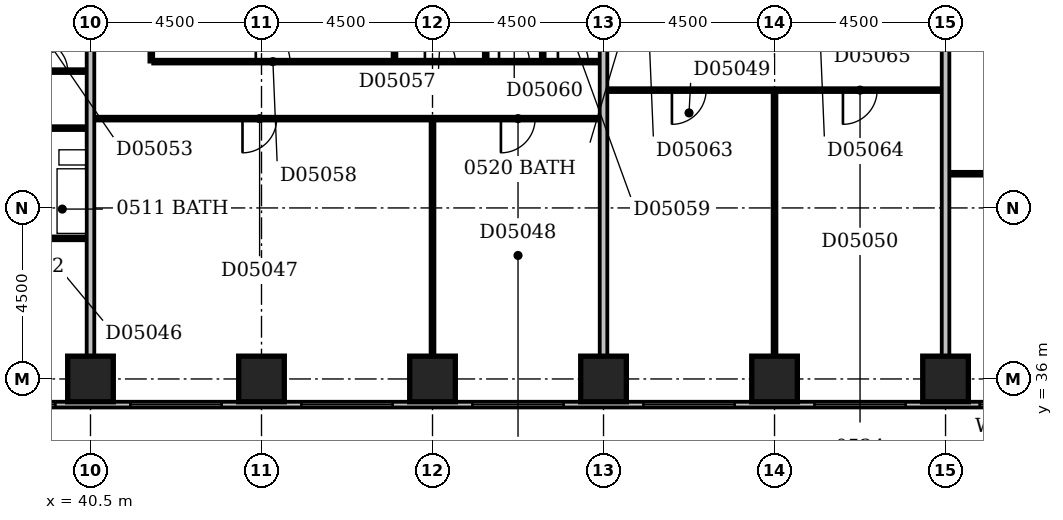
"""IFC4 building model, lengths in metres.
Left out: names, types, materials, properties, quantities, classifications, styles, units other than length and angle.
Written with IfcOpenShell. Run it as: python <this file> out.ifc"""

import sys

from ifc_helpers import new_model, si_unit, direction, frame, frame_2d, origin, origin_2d, place, context, subcontext, project, spatial, rectangle, extrude, element, fill, save


model = new_model("IFC4")
c1 = context("Model", 3, precision=1e-05, world=origin(), true_north=direction((0.0, 1.0)))
c2 = subcontext(c1, "Body", "Model", "MODEL_VIEW")
j1 = project(units=[si_unit("LENGTHUNIT", "METRE"), si_unit("PLANEANGLEUNIT", "RADIAN")], contexts=[c1])
p1 = place(None, origin())
s1 = spatial("IfcSite", under=j1, at=p1, CompositionType="ELEMENT")
p2 = place(p1, origin())
s2 = spatial("IfcBuilding", under=s1, at=p2, CompositionType="ELEMENT")
p3 = place(p2, frame((0.0, 0.0, 29.0)))
s3 = spatial("IfcBuildingStorey", under=s2, at=p3, CompositionType="ELEMENT", Elevation=29.0)
for number, where, z_axis, x_axis in (
    (1, (40.5, 36.0, -0.3), (0.0, 0.0, 1.0), (1.0, 0.0, 0.0)),
    (2, (45.0, 36.0, -0.3), (0.0, 0.0, 1.0), (1.0, 0.0, 0.0)),
    (3, (49.5, 36.0, -0.3), (0.0, 0.0, 1.0), (1.0, 0.0, 0.0)),
    (4, (54.0, 36.0, -0.3), (0.0, 0.0, 1.0), (1.0, 0.0, 0.0)),
    (5, (58.5, 36.0, -0.3), (0.0, 0.0, 1.0), (1.0, 0.0, 0.0)),
    (6, (63.0, 36.0, -0.3), (0.0, 0.0, 1.0), (1.0, 0.0, 0.0)),
):
    element("IfcColumn", number, at=place(p3, frame(where, z_axis=z_axis, x_axis=x_axis)), inside=s3, PredefinedType="COLUMN", context=c2, shape_type="SweptSolid", body=[
        extrude(rectangle(XDim=1.2, YDim=1.2, at=origin_2d()), origin(), (0.0, 0.0, 1.0), 3.6),
    ])
p4 = place(p3, frame((23.1, 35.325, 0.0), z_axis=(0.0, 0.0, 1.0), x_axis=(1.0, 0.0, 0.0)))
e7 = element("IfcWall", 7, at=p4, inside=s3, PredefinedType="STANDARD", context=c2, shape_type="SweptSolid", body=[
    extrude(rectangle(XDim=45.15, YDim=0.15, at=frame_2d((22.575, 0.0))), origin(), (0.0, 0.0, 1.0), 2.7),
])
p5 = place(p4, frame((0.45, 0.0, 0.6)))
e8 = element("IfcOpeningElement", 8, at=p5, cuts=e7, PredefinedType="OPENING", context=c2, shape_type="SweptSolid", body=[
    extrude(rectangle(XDim=2.4, YDim=1.8, at=frame_2d((1.2, 0.9))), frame((0.0, 0.087, 0.0), z_axis=(0.0, -1.0, 0.0), x_axis=(1.0, 0.0, 0.0)), (0.0, 0.0, 1.0), 0.174),
])
p6 = place(p4, frame((4.95, 0.0, 0.6)))
e9 = element("IfcOpeningElement", 9, at=p6, cuts=e7, PredefinedType="OPENING", context=c2, shape_type="SweptSolid", body=[
    extrude(rectangle(XDim=2.4, YDim=1.8, at=frame_2d((1.2, 0.9))), frame((0.0, 0.087, 0.0), z_axis=(0.0, -1.0, 0.0), x_axis=(1.0, 0.0, 0.0)), (0.0, 0.0, 1.0), 0.174),
])
p7 = place(p4, frame((9.25, 0.0, 0.6)))
e10 = element("IfcOpeningElement", 10, at=p7, cuts=e7, PredefinedType="OPENING", context=c2, shape_type="SweptSolid", body=[
    extrude(rectangle(XDim=1.5, YDim=1.8, at=frame_2d((0.75, 0.9))), frame((0.0, 0.087, 0.0), z_axis=(0.0, -1.0, 0.0), x_axis=(1.0, 0.0, 0.0)), (0.0, 0.0, 1.0), 0.174),
])
p8 = place(p4, frame((15.277, 0.0, 0.6)))
e11 = element("IfcOpeningElement", 11, at=p8, cuts=e7, PredefinedType="OPENING", context=c2, shape_type="SweptSolid", body=[
    extrude(rectangle(XDim=1.2, YDim=1.8, at=frame_2d((0.6, 0.9))), frame((0.0, 0.087, 0.0), z_axis=(0.0, -1.0, 0.0), x_axis=(1.0, 0.0, 0.0)), (0.0, 0.0, 1.0), 0.174),
])
p9 = place(p4, frame((18.45, 0.0, 0.6)))
e12 = element("IfcOpeningElement", 12, at=p9, cuts=e7, PredefinedType="OPENING", context=c2, shape_type="SweptSolid", body=[
    extrude(rectangle(XDim=2.4, YDim=1.8, at=frame_2d((1.2, 0.9))), frame((0.0, 0.087, 0.0), z_axis=(0.0, -1.0, 0.0), x_axis=(1.0, 0.0, 0.0)), (0.0, 0.0, 1.0), 0.174),
])
p10 = place(p4, frame((22.95, 0.0, 0.6)))
e13 = element("IfcOpeningElement", 13, at=p10, cuts=e7, PredefinedType="OPENING", context=c2, shape_type="SweptSolid", body=[
    extrude(rectangle(XDim=2.4, YDim=1.8, at=frame_2d((1.2, 0.9))), frame((0.0, 0.087, 0.0), z_axis=(0.0, -1.0, 0.0), x_axis=(1.0, 0.0, 0.0)), (0.0, 0.0, 1.0), 0.174),
])
p11 = place(p4, frame((27.45, 0.0, 0.6)))
e14 = element("IfcOpeningElement", 14, at=p11, cuts=e7, PredefinedType="OPENING", context=c2, shape_type="SweptSolid", body=[
    extrude(rectangle(XDim=2.4, YDim=1.8, at=frame_2d((1.2, 0.9))), frame((0.0, 0.087, 0.0), z_axis=(0.0, -1.0, 0.0), x_axis=(1.0, 0.0, 0.0)), (0.0, 0.0, 1.0), 0.174),
])
p12 = place(p4, frame((31.95, 0.0, 0.6)))
e15 = element("IfcOpeningElement", 15, at=p12, cuts=e7, PredefinedType="OPENING", context=c2, shape_type="SweptSolid", body=[
    extrude(rectangle(XDim=2.4, YDim=1.8, at=frame_2d((1.2, 0.9))), frame((0.0, 0.087, 0.0), z_axis=(0.0, -1.0, 0.0), x_axis=(1.0, 0.0, 0.0)), (0.0, 0.0, 1.0), 0.174),
])
p13 = place(p4, frame((36.45, 0.0, 0.6)))
e16 = element("IfcOpeningElement", 16, at=p13, cuts=e7, PredefinedType="OPENING", context=c2, shape_type="SweptSolid", body=[
    extrude(rectangle(XDim=2.4, YDim=1.8, at=frame_2d((1.2, 0.9))), frame((0.0, 0.087, 0.0), z_axis=(0.0, -1.0, 0.0), x_axis=(1.0, 0.0, 0.0)), (0.0, 0.0, 1.0), 0.174),
])
p14 = place(p4, frame((40.797, 0.0, 0.6)))
e17 = element("IfcOpeningElement", 17, at=p14, cuts=e7, PredefinedType="OPENING", context=c2, shape_type="SweptSolid", body=[
    extrude(rectangle(XDim=0.6, YDim=1.8, at=frame_2d((0.3, 0.9))), frame((0.0, 0.087, 0.0), z_axis=(0.0, -1.0, 0.0), x_axis=(1.0, 0.0, 0.0)), (0.0, 0.0, 1.0), 0.174),
])
p15 = place(p3, frame((40.5, 36.6, 0.0), z_axis=(0.0, 0.0, 1.0), x_axis=(0.0, 1.0, 0.0)))
e18 = element("IfcWall", 18, at=p15, inside=s3, PredefinedType="PARTITIONING", context=c2, shape_type="SweptSolid", body=[
    extrude(rectangle(XDim=12.8, YDim=0.2, at=frame_2d((6.4, 0.0))), origin(), (0.0, 0.0, 1.0), 3.3),
])
p16 = place(p3, frame((49.5, 36.6, 0.0), z_axis=(0.0, 0.0, 1.0), x_axis=(0.0, 1.0, 0.0)))
e19 = element("IfcWall", 19, at=p16, inside=s3, PredefinedType="PARTITIONING", context=c2, shape_type="SweptSolid", body=[
    extrude(rectangle(XDim=6.2, YDim=0.1, at=frame_2d((3.1, 0.0))), origin(), (0.0, 0.0, 1.0), 3.3),
])
p17 = place(p3, frame((54.0, 36.6, 0.0), z_axis=(0.0, 0.0, 1.0), x_axis=(0.0, 1.0, 0.0)))
e20 = element("IfcWall", 20, at=p17, inside=s3, PredefinedType="PARTITIONING", context=c2, shape_type="SweptSolid", body=[
    extrude(rectangle(XDim=12.8, YDim=0.2, at=frame_2d((6.4, 0.0))), origin(), (0.0, 0.0, 1.0), 2.6),
])
p18 = place(p3, frame((58.5, 36.6, 0.0), z_axis=(0.0, 0.0, 1.0), x_axis=(0.0, 1.0, 0.0)))
e21 = element("IfcWall", 21, at=p18, inside=s3, PredefinedType="PARTITIONING", context=c2, shape_type="SweptSolid", body=[
    extrude(rectangle(XDim=6.95, YDim=0.1, at=frame_2d((3.475, 0.0))), origin(), (0.0, 0.0, 1.0), 3.3),
])
p19 = place(p3, frame((63.0, 36.6, 0.0), z_axis=(0.0, 0.0, 1.0), x_axis=(0.0, 1.0, 0.0)))
e22 = element("IfcWall", 22, at=p19, inside=s3, PredefinedType="PARTITIONING", context=c2, shape_type="SweptSolid", body=[
    extrude(rectangle(XDim=12.8, YDim=0.2, at=frame_2d((6.4, 0.0))), origin(), (0.0, 0.0, 1.0), 2.4),
])
p20 = place(p3, frame((38.25, 39.7, 0.0), z_axis=(0.0, 0.0, 1.0), x_axis=(1.0, 0.0, 0.0)))
e23 = element("IfcWall", 23, at=p20, inside=s3, PredefinedType="PLUMBINGWALL", context=c2, shape_type="SweptSolid", body=[
    extrude(rectangle(XDim=2.15, YDim=0.1, at=frame_2d((1.075, 0.0))), origin(), (0.0, 0.0, 1.0), 3.3),
])
p21 = place(p3, frame((63.1, 41.4, 0.0), z_axis=(0.0, 0.0, 1.0), x_axis=(1.0, 0.0, 0.0)))
e24 = element("IfcWall", 24, at=p21, inside=s3, PredefinedType="PARTITIONING", context=c2, shape_type="SweptSolid", body=[
    extrude(rectangle(XDim=5.0, YDim=0.1, at=frame_2d((2.5, 0.0))), origin(), (0.0, 0.0, 1.0), 3.3),
])
p22 = place(p21, frame((1.7, 0.0, 0.0)))
e25 = element("IfcOpeningElement", 25, at=p22, cuts=e24, PredefinedType="OPENING", context=c2, shape_type="SweptSolid", body=[
    extrude(rectangle(XDim=0.9, YDim=2.1, at=frame_2d((0.45, 1.05))), frame((0.0, 0.062, 0.0), z_axis=(0.0, -1.0, 0.0), x_axis=(1.0, 0.0, 0.0)), (0.0, 0.0, 1.0), 0.124),
])
p23 = place(p3, frame((22.6, 42.6, 0.0), z_axis=(0.0, 0.0, 1.0), x_axis=(1.0, 0.0, 0.0)))
e26 = element("IfcWall", 26, at=p23, inside=s3, PredefinedType="PARTITIONING", context=c2, shape_type="SweptSolid", body=[
    extrude(rectangle(XDim=17.8, YDim=0.1, at=frame_2d((8.9, 0.0))), origin(), (0.0, 0.0, 1.0), 3.3),
])
p24 = place(p23, frame((3.9, 0.0, 0.0)))
e27 = element("IfcOpeningElement", 27, at=p24, cuts=e26, PredefinedType="OPENING", context=c2, shape_type="SweptSolid", body=[
    extrude(rectangle(XDim=0.9, YDim=2.1, at=frame_2d((0.45, 1.05))), frame((0.0, 0.062, 0.0), z_axis=(0.0, -1.0, 0.0), x_axis=(1.0, 0.0, 0.0)), (0.0, 0.0, 1.0), 0.124),
])
p25 = place(p23, frame((10.7, 0.0, 0.0)))
e28 = element("IfcOpeningElement", 28, at=p25, cuts=e26, PredefinedType="OPENING", context=c2, shape_type="SweptSolid", body=[
    extrude(rectangle(XDim=0.9, YDim=2.1, at=frame_2d((0.45, 1.05))), frame((0.0, 0.062, 0.0), z_axis=(0.0, -1.0, 0.0), x_axis=(1.0, 0.0, 0.0)), (0.0, 0.0, 1.0), 0.124),
])
p26 = place(p23, frame((14.05, 0.0, 0.0)))
e29 = element("IfcOpeningElement", 29, at=p26, cuts=e26, PredefinedType="OPENING", context=c2, shape_type="SweptSolid", body=[
    extrude(rectangle(XDim=0.9, YDim=2.1, at=frame_2d((0.45, 1.05))), frame((0.0, 0.062, 0.0), z_axis=(0.0, -1.0, 0.0), x_axis=(1.0, 0.0, 0.0)), (0.0, 0.0, 1.0), 0.124),
])
p27 = place(p3, frame((40.6, 42.85, 0.0), z_axis=(0.0, 0.0, 1.0), x_axis=(1.0, 0.0, 0.0)))
e30 = element("IfcWall", 30, at=p27, inside=s3, PredefinedType="PARTITIONING", context=c2, shape_type="SweptSolid", body=[
    extrude(rectangle(XDim=13.3, YDim=0.1, at=frame_2d((6.65, 0.0))), origin(), (0.0, 0.0, 1.0), 3.3),
])
p28 = place(p27, frame((3.9, 0.0, 0.0)))
e31 = element("IfcOpeningElement", 31, at=p28, cuts=e30, PredefinedType="OPENING", context=c2, shape_type="SweptSolid", body=[
    extrude(rectangle(XDim=0.9, YDim=2.1, at=frame_2d((0.45, 1.05))), frame((0.0, 0.062, 0.0), z_axis=(0.0, -1.0, 0.0), x_axis=(1.0, 0.0, 0.0)), (0.0, 0.0, 1.0), 0.124),
])
p29 = place(p27, frame((10.7, 0.0, 0.0)))
e32 = element("IfcOpeningElement", 32, at=p29, cuts=e30, PredefinedType="OPENING", context=c2, shape_type="SweptSolid", body=[
    extrude(rectangle(XDim=0.9, YDim=2.1, at=frame_2d((0.45, 1.05))), frame((0.0, 0.062, 0.0), z_axis=(0.0, -1.0, 0.0), x_axis=(1.0, 0.0, 0.0)), (0.0, 0.0, 1.0), 0.124),
])
p30 = place(p3, frame((54.1, 43.6, 0.0), z_axis=(0.0, 0.0, 1.0), x_axis=(1.0, 0.0, 0.0)))
e33 = element("IfcWall", 33, at=p30, inside=s3, PredefinedType="PARTITIONING", context=c2, shape_type="SweptSolid", body=[
    extrude(rectangle(XDim=8.8, YDim=0.1, at=frame_2d((4.4, 0.0))), origin(), (0.0, 0.0, 1.0), 3.3),
])
p31 = place(p30, frame((1.7, 0.0, 0.0)))
e34 = element("IfcOpeningElement", 34, at=p31, cuts=e33, PredefinedType="OPENING", context=c2, shape_type="SweptSolid", body=[
    extrude(rectangle(XDim=0.9, YDim=2.1, at=frame_2d((0.45, 1.05))), frame((0.0, 0.062, 0.0), z_axis=(0.0, -1.0, 0.0), x_axis=(1.0, 0.0, 0.0)), (0.0, 0.0, 1.0), 0.124),
])
p32 = place(p30, frame((6.2, 0.0, 0.0)))
e35 = element("IfcOpeningElement", 35, at=p32, cuts=e33, PredefinedType="OPENING", context=c2, shape_type="SweptSolid", body=[
    extrude(rectangle(XDim=0.9, YDim=2.1, at=frame_2d((0.45, 1.05))), frame((0.0, 0.062, 0.0), z_axis=(0.0, -1.0, 0.0), x_axis=(1.0, 0.0, 0.0)), (0.0, 0.0, 1.0), 0.124),
])
p33 = place(p3, frame((31.05, 44.1, 0.0), z_axis=(0.0, 0.0, 1.0), x_axis=(1.0, 0.0, 0.0)))
e36 = element("IfcWall", 36, at=p33, inside=s3, PredefinedType="PARTITIONING", context=c2, shape_type="SweptSolid", body=[
    extrude(rectangle(XDim=9.35, YDim=0.1, at=frame_2d((4.675, 0.0))), origin(), (0.0, 0.0, 1.0), 3.3),
])
p34 = place(p33, frame((0.75, 0.0, 0.0)))
e37 = element("IfcOpeningElement", 37, at=p34, cuts=e36, PredefinedType="OPENING", context=c2, shape_type="SweptSolid", body=[
    extrude(rectangle(XDim=0.8, YDim=2.1, at=frame_2d((0.4, 1.05))), frame((0.0, 0.062, 0.0), z_axis=(0.0, -1.0, 0.0), x_axis=(1.0, 0.0, 0.0)), (0.0, 0.0, 1.0), 0.124),
])
p35 = place(p33, frame((8.05, 0.0, 0.0)))
e38 = element("IfcOpeningElement", 38, at=p35, cuts=e36, PredefinedType="OPENING", context=c2, shape_type="SweptSolid", body=[
    extrude(rectangle(XDim=0.8, YDim=2.1, at=frame_2d((0.4, 1.05))), frame((0.0, 0.062, 0.0), z_axis=(0.0, -1.0, 0.0), x_axis=(1.0, 0.0, 0.0)), (0.0, 0.0, 1.0), 0.124),
])
p36 = place(p33, frame((4.25, 0.0, 0.0)))
e39 = element("IfcOpeningElement", 39, at=p36, cuts=e36, PredefinedType="OPENING", context=c2, shape_type="SweptSolid", body=[
    extrude(rectangle(XDim=0.8, YDim=2.1, at=frame_2d((0.4, 1.05))), frame((0.0, 0.062, 0.0), z_axis=(0.0, -1.0, 0.0), x_axis=(1.0, 0.0, 0.0)), (0.0, 0.0, 1.0), 0.124),
])
p37 = place(p33, frame((6.05, 0.0, 0.0)))
e40 = element("IfcOpeningElement", 40, at=p37, cuts=e36, PredefinedType="OPENING", context=c2, shape_type="SweptSolid", body=[
    extrude(rectangle(XDim=0.8, YDim=2.1, at=frame_2d((0.4, 1.05))), frame((0.0, 0.062, 0.0), z_axis=(0.0, -1.0, 0.0), x_axis=(1.0, 0.0, 0.0)), (0.0, 0.0, 1.0), 0.124),
])
p38 = place(p33, frame((2.7, 0.0, 0.0)))
e41 = element("IfcOpeningElement", 41, at=p38, cuts=e36, PredefinedType="OPENING", context=c2, shape_type="SweptSolid", body=[
    extrude(rectangle(XDim=0.8, YDim=2.1, at=frame_2d((0.4, 1.05))), frame((0.0, 0.062, 0.0), z_axis=(0.0, -1.0, 0.0), x_axis=(1.0, 0.0, 0.0)), (0.0, 0.0, 1.0), 0.124),
])
p39 = place(p3, frame((42.1, 44.35, 0.0), z_axis=(0.0, 0.0, 1.0), x_axis=(0.0, 1.0, 0.0)))
e42 = element("IfcWall", 42, at=p39, inside=s3, PredefinedType="PARTITIONING", context=c2, shape_type="SweptSolid", body=[
    extrude(rectangle(XDim=5.05, YDim=0.1, at=frame_2d((2.525, 0.0))), origin(), (0.0, 0.0, 1.0), 3.3),
])
p40 = place(p3, frame((42.15, 44.35, 0.0), z_axis=(0.0, 0.0, 1.0), x_axis=(1.0, 0.0, 0.0)))
e43 = element("IfcWall", 43, at=p40, inside=s3, PredefinedType="PARTITIONING", context=c2, shape_type="SweptSolid", body=[
    extrude(rectangle(XDim=11.75, YDim=0.1, at=frame_2d((5.875, 0.0))), origin(), (0.0, 0.0, 1.0), 3.3),
])
p41 = place(p40, frame((7.15, 0.0, 0.0)))
e44 = element("IfcOpeningElement", 44, at=p41, cuts=e43, PredefinedType="OPENING", context=c2, shape_type="SweptSolid", body=[
    extrude(rectangle(XDim=0.8, YDim=2.1, at=frame_2d((0.4, 1.05))), frame((0.0, 0.062, 0.0), z_axis=(0.0, -1.0, 0.0), x_axis=(1.0, 0.0, 0.0)), (0.0, 0.0, 1.0), 0.124),
])
p42 = place(p40, frame((2.7, 0.0, 0.0)))
e45 = element("IfcOpeningElement", 45, at=p42, cuts=e43, PredefinedType="OPENING", context=c2, shape_type="SweptSolid", body=[
    extrude(rectangle(XDim=0.9, YDim=2.1, at=frame_2d((0.45, 1.05))), frame((0.0, 0.062, 0.0), z_axis=(0.0, -1.0, 0.0), x_axis=(1.0, 0.0, 0.0)), (0.0, 0.0, 1.0), 0.124),
])
p43 = place(p40, frame((10.65, 0.0, 0.0)))
e46 = element("IfcOpeningElement", 46, at=p43, cuts=e43, PredefinedType="OPENING", context=c2, shape_type="SweptSolid", body=[
    extrude(rectangle(XDim=0.8, YDim=2.1, at=frame_2d((0.4, 1.05))), frame((0.0, 0.062, 0.0), z_axis=(0.0, -1.0, 0.0), x_axis=(1.0, 0.0, 0.0)), (0.0, 0.0, 1.0), 0.124),
])
p44 = place(p40, frame((9.1, 0.0, 0.0)))
e47 = element("IfcOpeningElement", 47, at=p44, cuts=e43, PredefinedType="OPENING", context=c2, shape_type="SweptSolid", body=[
    extrude(rectangle(XDim=0.8, YDim=2.1, at=frame_2d((0.4, 1.05))), frame((0.0, 0.062, 0.0), z_axis=(0.0, -1.0, 0.0), x_axis=(1.0, 0.0, 0.0)), (0.0, 0.0, 1.0), 0.124),
])
for number, where, z_axis, x_axis in (
    (48, (48.5, 44.4, 0.0), (0.0, 0.0, 1.0), (0.0, 1.0, 0.0)),
    (49, (50.9, 44.4, 0.0), (0.0, 0.0, 1.0), (0.0, 1.0, 0.0)),
    (50, (52.4, 44.4, 0.0), (0.0, 0.0, 1.0), (0.0, 1.0, 0.0)),
):
    element("IfcWall", number, at=place(p3, frame(where, z_axis=z_axis, x_axis=x_axis)), inside=s3, PredefinedType="PLUMBINGWALL", context=c2, shape_type="SweptSolid", body=[
        extrude(rectangle(XDim=5.0, YDim=0.1, at=frame_2d((2.5, 0.0))), origin(), (0.0, 0.0, 1.0), 3.3),
    ])
p45 = place(p8, origin())
e51 = element("IfcWindow", 51, at=p45, inside=s3, PartitioningType="SINGLE_PANEL", PredefinedType="WINDOW", context=c2, shape_type="SweptSolid", body=[
    extrude(rectangle(XDim=1.2, YDim=1.8, at=frame_2d((0.6, 0.9))), frame((0.0, 0.03, 0.0), z_axis=(0.0, -1.0, 0.0), x_axis=(1.0, 0.0, 0.0)), (0.0, 0.0, 1.0), 0.06),
])
fill(e11, e51)
p46 = place(p9, origin())
e52 = element("IfcWindow", 52, at=p46, inside=s3, PartitioningType="SINGLE_PANEL", PredefinedType="WINDOW", context=c2, shape_type="SweptSolid", body=[
    extrude(rectangle(XDim=2.4, YDim=1.8, at=frame_2d((1.2, 0.9))), frame((0.0, 0.03, 0.0), z_axis=(0.0, -1.0, 0.0), x_axis=(1.0, 0.0, 0.0)), (0.0, 0.0, 1.0), 0.06),
])
fill(e12, e52)
p47 = place(p10, origin())
e53 = element("IfcWindow", 53, at=p47, inside=s3, PartitioningType="SINGLE_PANEL", PredefinedType="WINDOW", context=c2, shape_type="SweptSolid", body=[
    extrude(rectangle(XDim=2.4, YDim=1.8, at=frame_2d((1.2, 0.9))), frame((0.0, 0.03, 0.0), z_axis=(0.0, -1.0, 0.0), x_axis=(1.0, 0.0, 0.0)), (0.0, 0.0, 1.0), 0.06),
])
fill(e13, e53)
p48 = place(p11, origin())
e54 = element("IfcWindow", 54, at=p48, inside=s3, PartitioningType="SINGLE_PANEL", PredefinedType="WINDOW", context=c2, shape_type="SweptSolid", body=[
    extrude(rectangle(XDim=2.4, YDim=1.8, at=frame_2d((1.2, 0.9))), frame((0.0, 0.03, 0.0), z_axis=(0.0, -1.0, 0.0), x_axis=(1.0, 0.0, 0.0)), (0.0, 0.0, 1.0), 0.06),
])
fill(e14, e54)
p49 = place(p12, origin())
e55 = element("IfcWindow", 55, at=p49, inside=s3, PartitioningType="SINGLE_PANEL", PredefinedType="WINDOW", context=c2, shape_type="SweptSolid", body=[
    extrude(rectangle(XDim=2.4, YDim=1.8, at=frame_2d((1.2, 0.9))), frame((0.0, 0.03, 0.0), z_axis=(0.0, -1.0, 0.0), x_axis=(1.0, 0.0, 0.0)), (0.0, 0.0, 1.0), 0.06),
])
fill(e15, e55)
p50 = place(p13, origin())
e56 = element("IfcWindow", 56, at=p50, inside=s3, PartitioningType="SINGLE_PANEL", PredefinedType="WINDOW", context=c2, shape_type="SweptSolid", body=[
    extrude(rectangle(XDim=2.4, YDim=1.8, at=frame_2d((1.2, 0.9))), frame((0.0, 0.03, 0.0), z_axis=(0.0, -1.0, 0.0), x_axis=(1.0, 0.0, 0.0)), (0.0, 0.0, 1.0), 0.06),
])
fill(e16, e56)
p51 = place(p14, origin())
e57 = element("IfcWindow", 57, at=p51, inside=s3, PartitioningType="SINGLE_PANEL", PredefinedType="WINDOW", context=c2, shape_type="SweptSolid", body=[
    extrude(rectangle(XDim=0.6, YDim=1.8, at=frame_2d((0.3, 0.9))), frame((0.0, 0.03, 0.0), z_axis=(0.0, -1.0, 0.0), x_axis=(1.0, 0.0, 0.0)), (0.0, 0.0, 1.0), 0.06),
])
fill(e17, e57)
p52 = place(p28, frame((0.9, 0.0, 0.0), z_axis=(0.0, 0.0, 1.0), x_axis=(-1.0, 0.0, 0.0)))
e58 = element("IfcDoor", 58, at=p52, inside=s3, OperationType="SINGLE_SWING_RIGHT", PredefinedType="DOOR", context=c2, shape_type="SweptSolid", body=[
    extrude(rectangle(XDim=0.9, YDim=2.1, at=frame_2d((0.45, 1.05))), frame((0.0, 0.025, 0.0), z_axis=(0.0, -1.0, 0.0), x_axis=(1.0, 0.0, 0.0)), (0.0, 0.0, 1.0), 0.05),
])
fill(e31, e58)
p53 = place(p29, frame((0.9, 0.0, 0.0), z_axis=(0.0, 0.0, 1.0), x_axis=(-1.0, 0.0, 0.0)))
e59 = element("IfcDoor", 59, at=p53, inside=s3, OperationType="SINGLE_SWING_RIGHT", PredefinedType="DOOR", context=c2, shape_type="SweptSolid", body=[
    extrude(rectangle(XDim=0.9, YDim=2.1, at=frame_2d((0.45, 1.05))), frame((0.0, 0.025, 0.0), z_axis=(0.0, -1.0, 0.0), x_axis=(1.0, 0.0, 0.0)), (0.0, 0.0, 1.0), 0.05),
])
fill(e32, e59)
p54 = place(p31, frame((0.9, 0.0, 0.0), z_axis=(0.0, 0.0, 1.0), x_axis=(-1.0, 0.0, 0.0)))
e60 = element("IfcDoor", 60, at=p54, inside=s3, OperationType="SINGLE_SWING_RIGHT", PredefinedType="DOOR", context=c2, shape_type="SweptSolid", body=[
    extrude(rectangle(XDim=0.9, YDim=2.1, at=frame_2d((0.45, 1.05))), frame((0.0, 0.025, 0.0), z_axis=(0.0, -1.0, 0.0), x_axis=(1.0, 0.0, 0.0)), (0.0, 0.0, 1.0), 0.05),
])
fill(e34, e60)
p55 = place(p32, frame((0.9, 0.0, 0.0), z_axis=(0.0, 0.0, 1.0), x_axis=(-1.0, 0.0, 0.0)))
e61 = element("IfcDoor", 61, at=p55, inside=s3, OperationType="SINGLE_SWING_RIGHT", PredefinedType="DOOR", context=c2, shape_type="SweptSolid", body=[
    extrude(rectangle(XDim=0.9, YDim=2.1, at=frame_2d((0.45, 1.05))), frame((0.0, 0.025, 0.0), z_axis=(0.0, -1.0, 0.0), x_axis=(1.0, 0.0, 0.0)), (0.0, 0.0, 1.0), 0.05),
])
fill(e35, e61)
p56 = place(p35, origin())
e62 = element("IfcDoor", 62, at=p56, inside=s3, OperationType="SINGLE_SWING_LEFT", PredefinedType="DOOR", context=c2, shape_type="SweptSolid", body=[
    extrude(rectangle(XDim=0.8, YDim=2.1, at=frame_2d((0.4, 1.05))), frame((0.0, 0.025, 0.0), z_axis=(0.0, -1.0, 0.0), x_axis=(1.0, 0.0, 0.0)), (0.0, 0.0, 1.0), 0.05),
])
fill(e38, e62)
p57 = place(p41, origin())
e63 = element("IfcDoor", 63, at=p57, inside=s3, OperationType="SINGLE_SWING_LEFT", PredefinedType="DOOR", context=c2, shape_type="SweptSolid", body=[
    extrude(rectangle(XDim=0.8, YDim=2.1, at=frame_2d((0.4, 1.05))), frame((0.0, 0.025, 0.0), z_axis=(0.0, -1.0, 0.0), x_axis=(1.0, 0.0, 0.0)), (0.0, 0.0, 1.0), 0.05),
])
fill(e44, e63)
p58 = place(p42, origin())
e64 = element("IfcDoor", 64, at=p58, inside=s3, OperationType="SINGLE_SWING_LEFT", PredefinedType="DOOR", context=c2, shape_type="SweptSolid", body=[
    extrude(rectangle(XDim=0.9, YDim=2.1, at=frame_2d((0.45, 1.05))), frame((0.0, 0.025, 0.0), z_axis=(0.0, -1.0, 0.0), x_axis=(1.0, 0.0, 0.0)), (0.0, 0.0, 1.0), 0.05),
])
fill(e45, e64)
p59 = place(p43, origin())
e65 = element("IfcDoor", 65, at=p59, inside=s3, OperationType="SINGLE_SWING_LEFT", PredefinedType="DOOR", context=c2, shape_type="SweptSolid", body=[
    extrude(rectangle(XDim=0.8, YDim=2.1, at=frame_2d((0.4, 1.05))), frame((0.0, 0.025, 0.0), z_axis=(0.0, -1.0, 0.0), x_axis=(1.0, 0.0, 0.0)), (0.0, 0.0, 1.0), 0.05),
])
fill(e46, e65)
p60 = place(p44, origin())
e66 = element("IfcDoor", 66, at=p60, inside=s3, OperationType="SINGLE_SWING_LEFT", PredefinedType="DOOR", context=c2, shape_type="SweptSolid", body=[
    extrude(rectangle(XDim=0.8, YDim=2.1, at=frame_2d((0.4, 1.05))), frame((0.0, 0.025, 0.0), z_axis=(0.0, -1.0, 0.0), x_axis=(1.0, 0.0, 0.0)), (0.0, 0.0, 1.0), 0.05),
])
fill(e47, e66)
save(model, sys.argv[1])
